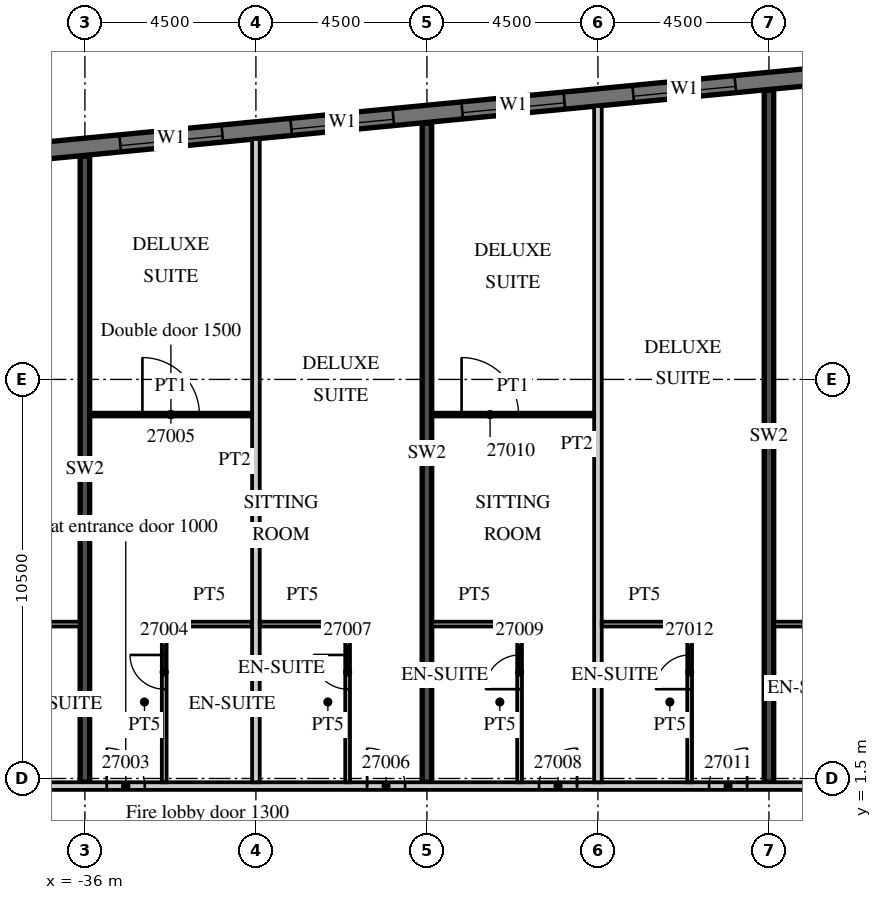
"""IFC4 building model, lengths in metres.
Left out: names, types, materials, properties, quantities, classifications, styles, units other than length and angle.
Written with IfcOpenShell. Run it as: python <this file> out.ifc"""

import sys

from ifc_helpers import new_model, si_unit, direction, frame, frame_2d, origin, place, context, subcontext, project, spatial, rectangle, extrude, element, fill, save


model = new_model("IFC4")
c1 = context("Model", 3, precision=1e-05, world=origin(), true_north=direction((0.0, 1.0)))
c2 = subcontext(c1, "Body", "Model", "MODEL_VIEW")
j1 = project(units=[si_unit("LENGTHUNIT", "METRE"), si_unit("PLANEANGLEUNIT", "RADIAN")], contexts=[c1])
p1 = place(None, origin())
s1 = spatial("IfcSite", under=j1, at=p1, CompositionType="ELEMENT")
p2 = place(p1, origin())
s2 = spatial("IfcBuilding", under=s1, at=p2, CompositionType="ELEMENT")
p3 = place(p2, frame((0.0, 0.0, 124.0)))
s3 = spatial("IfcBuildingStorey", under=s2, at=p3, CompositionType="ELEMENT", Elevation=124.0)
p4 = place(p3, frame((-36.0, 1.4, 0.0), z_axis=(0.0, 0.0, 1.0), x_axis=(0.0, 1.0, 0.0)))
e1 = element("IfcWall", 1, at=p4, inside=s3, PredefinedType="SHEAR", context=c2, shape_type="SweptSolid", body=[
    extrude(rectangle(XDim=16.474, YDim=0.25, at=frame_2d((8.237, 0.0))), origin(), (0.0, 0.0, 1.0), 3.3),
])
p5 = place(p3, frame((-27.0, 1.4, 0.0), z_axis=(0.0, 0.0, 1.0), x_axis=(0.0, 1.0, 0.0)))
e2 = element("IfcWall", 2, at=p5, inside=s3, PredefinedType="SHEAR", context=c2, shape_type="SweptSolid", body=[
    extrude(rectangle(XDim=17.34, YDim=0.25, at=frame_2d((8.67, 0.0))), origin(), (0.0, 0.0, 1.0), 3.3),
])
p6 = place(p3, frame((-18.0, 1.4, 0.0), z_axis=(0.0, 0.0, 1.0), x_axis=(0.0, 1.0, 0.0)))
e3 = element("IfcWall", 3, at=p6, inside=s3, PredefinedType="SHEAR", context=c2, shape_type="SweptSolid", body=[
    extrude(rectangle(XDim=18.207, YDim=0.25, at=frame_2d((9.104, 0.0))), origin(), (0.0, 0.0, 1.0), 3.3),
])
p7 = place(p3, frame((13.521, 22.89, 0.0), z_axis=(0.0, 0.0, 1.0), x_axis=(-0.995396445054, -0.095843190545, 0.0)))
e4 = element("IfcWall", 4, at=p7, inside=s3, PredefinedType="SOLIDWALL", context=c2, shape_type="SweptSolid", body=[
    extrude(rectangle(XDim=51.114, YDim=0.45, at=frame_2d((25.557, 0.0))), origin(), (0.0, 0.0, 1.0), 3.02),
])
p8 = place(p7, frame((0.91, 0.0, 0.45)))
e5 = element("IfcOpeningElement", 5, at=p8, cuts=e4, PredefinedType="OPENING", context=c2, shape_type="SweptSolid", body=[
    extrude(rectangle(XDim=2.7, YDim=2.25, at=frame_2d((1.35, 1.125))), frame((0.0, 0.235, 0.0), z_axis=(0.0, -1.0, 0.0), x_axis=(1.0, 0.0, 0.0)), (0.0, 0.0, 1.0), 0.47),
])
p9 = place(p7, frame((5.431, 0.0, 0.45)))
e6 = element("IfcOpeningElement", 6, at=p9, cuts=e4, PredefinedType="OPENING", context=c2, shape_type="SweptSolid", body=[
    extrude(rectangle(XDim=2.7, YDim=2.25, at=frame_2d((1.35, 1.125))), frame((0.0, 0.235, 0.0), z_axis=(0.0, -1.0, 0.0), x_axis=(1.0, 0.0, 0.0)), (0.0, 0.0, 1.0), 0.47),
])
p10 = place(p7, frame((9.952, 0.0, 0.45)))
e7 = element("IfcOpeningElement", 7, at=p10, cuts=e4, PredefinedType="OPENING", context=c2, shape_type="SweptSolid", body=[
    extrude(rectangle(XDim=2.7, YDim=2.25, at=frame_2d((1.35, 1.125))), frame((0.0, 0.235, 0.0), z_axis=(0.0, -1.0, 0.0), x_axis=(1.0, 0.0, 0.0)), (0.0, 0.0, 1.0), 0.47),
])
p11 = place(p7, frame((14.473, 0.0, 0.45)))
e8 = element("IfcOpeningElement", 8, at=p11, cuts=e4, PredefinedType="OPENING", context=c2, shape_type="SweptSolid", body=[
    extrude(rectangle(XDim=2.7, YDim=2.25, at=frame_2d((1.35, 1.125))), frame((0.0, 0.235, 0.0), z_axis=(0.0, -1.0, 0.0), x_axis=(1.0, 0.0, 0.0)), (0.0, 0.0, 1.0), 0.47),
])
p12 = place(p7, frame((18.994, 0.0, 0.45)))
e9 = element("IfcOpeningElement", 9, at=p12, cuts=e4, PredefinedType="OPENING", context=c2, shape_type="SweptSolid", body=[
    extrude(rectangle(XDim=2.7, YDim=2.25, at=frame_2d((1.35, 1.125))), frame((0.0, 0.235, 0.0), z_axis=(0.0, -1.0, 0.0), x_axis=(1.0, 0.0, 0.0)), (0.0, 0.0, 1.0), 0.47),
])
p13 = place(p7, frame((23.514, 0.0, 0.45)))
e10 = element("IfcOpeningElement", 10, at=p13, cuts=e4, PredefinedType="OPENING", context=c2, shape_type="SweptSolid", body=[
    extrude(rectangle(XDim=2.7, YDim=2.25, at=frame_2d((1.35, 1.125))), frame((0.0, 0.235, 0.0), z_axis=(0.0, -1.0, 0.0), x_axis=(1.0, 0.0, 0.0)), (0.0, 0.0, 1.0), 0.47),
])
p14 = place(p7, frame((28.035, 0.0, 0.45)))
e11 = element("IfcOpeningElement", 11, at=p14, cuts=e4, PredefinedType="OPENING", context=c2, shape_type="SweptSolid", body=[
    extrude(rectangle(XDim=2.7, YDim=2.25, at=frame_2d((1.35, 1.125))), frame((0.0, 0.235, 0.0), z_axis=(0.0, -1.0, 0.0), x_axis=(1.0, 0.0, 0.0)), (0.0, 0.0, 1.0), 0.47),
])
p15 = place(p7, frame((32.556, 0.0, 0.45)))
e12 = element("IfcOpeningElement", 12, at=p15, cuts=e4, PredefinedType="OPENING", context=c2, shape_type="SweptSolid", body=[
    extrude(rectangle(XDim=2.7, YDim=2.25, at=frame_2d((1.35, 1.125))), frame((0.0, 0.235, 0.0), z_axis=(0.0, -1.0, 0.0), x_axis=(1.0, 0.0, 0.0)), (0.0, 0.0, 1.0), 0.47),
])
p16 = place(p7, frame((37.077, 0.0, 0.45)))
e13 = element("IfcOpeningElement", 13, at=p16, cuts=e4, PredefinedType="OPENING", context=c2, shape_type="SweptSolid", body=[
    extrude(rectangle(XDim=2.7, YDim=2.25, at=frame_2d((1.35, 1.125))), frame((0.0, 0.235, 0.0), z_axis=(0.0, -1.0, 0.0), x_axis=(1.0, 0.0, 0.0)), (0.0, 0.0, 1.0), 0.47),
])
p17 = place(p7, frame((41.598, 0.0, 0.45)))
e14 = element("IfcOpeningElement", 14, at=p17, cuts=e4, PredefinedType="OPENING", context=c2, shape_type="SweptSolid", body=[
    extrude(rectangle(XDim=2.7, YDim=2.25, at=frame_2d((1.35, 1.125))), frame((0.0, 0.235, 0.0), z_axis=(0.0, -1.0, 0.0), x_axis=(1.0, 0.0, 0.0)), (0.0, 0.0, 1.0), 0.47),
])
p18 = place(p7, frame((46.118, 0.0, 0.45)))
e15 = element("IfcOpeningElement", 15, at=p18, cuts=e4, PredefinedType="OPENING", context=c2, shape_type="SweptSolid", body=[
    extrude(rectangle(XDim=2.7, YDim=2.25, at=frame_2d((1.35, 1.125))), frame((0.0, 0.235, 0.0), z_axis=(0.0, -1.0, 0.0), x_axis=(1.0, 0.0, 0.0)), (0.0, 0.0, 1.0), 0.47),
])
p19 = place(p3, frame((-39.316, 1.3, 0.0), z_axis=(0.0, 0.0, 1.0), x_axis=(1.0, 0.0, 0.0)))
e16 = element("IfcWall", 16, at=p19, inside=s3, PredefinedType="PARTITIONING", context=c2, shape_type="SweptSolid", body=[
    extrude(rectangle(XDim=52.816, YDim=0.2, at=frame_2d((26.408, 0.0))), origin(), (0.0, 0.0, 1.0), 3.02),
])
p20 = place(p19, frame((0.15, 0.0, 0.0)))
e17 = element("IfcOpeningElement", 17, at=p20, cuts=e16, PredefinedType="OPENING", context=c2, shape_type="SweptSolid", body=[
    extrude(rectangle(XDim=0.9, YDim=2.1, at=frame_2d((0.45, 1.05))), frame((0.0, 0.11, 0.0), z_axis=(0.0, -1.0, 0.0), x_axis=(1.0, 0.0, 0.0)), (0.0, 0.0, 1.0), 0.22),
])
p21 = place(p19, frame((3.891, 0.0, 0.0)))
e18 = element("IfcOpeningElement", 18, at=p21, cuts=e16, PredefinedType="OPENING", context=c2, shape_type="SweptSolid", body=[
    extrude(rectangle(XDim=1.0, YDim=2.1, at=frame_2d((0.5, 1.05))), frame((0.0, 0.11, 0.0), z_axis=(0.0, -1.0, 0.0), x_axis=(1.0, 0.0, 0.0)), (0.0, 0.0, 1.0), 0.22),
])
p22 = place(p19, frame((10.741, 0.0, 0.0)))
e19 = element("IfcOpeningElement", 19, at=p22, cuts=e16, PredefinedType="OPENING", context=c2, shape_type="SweptSolid", body=[
    extrude(rectangle(XDim=1.0, YDim=2.1, at=frame_2d((0.5, 1.05))), frame((0.0, 0.11, 0.0), z_axis=(0.0, -1.0, 0.0), x_axis=(1.0, 0.0, 0.0)), (0.0, 0.0, 1.0), 0.22),
])
p23 = place(p19, frame((15.266, 0.0, 0.0)))
e20 = element("IfcOpeningElement", 20, at=p23, cuts=e16, PredefinedType="OPENING", context=c2, shape_type="SweptSolid", body=[
    extrude(rectangle(XDim=1.0, YDim=2.1, at=frame_2d((0.5, 1.05))), frame((0.0, 0.11, 0.0), z_axis=(0.0, -1.0, 0.0), x_axis=(1.0, 0.0, 0.0)), (0.0, 0.0, 1.0), 0.22),
])
p24 = place(p19, frame((19.741, 0.0, 0.0)))
e21 = element("IfcOpeningElement", 21, at=p24, cuts=e16, PredefinedType="OPENING", context=c2, shape_type="SweptSolid", body=[
    extrude(rectangle(XDim=1.0, YDim=2.1, at=frame_2d((0.5, 1.05))), frame((0.0, 0.11, 0.0), z_axis=(0.0, -1.0, 0.0), x_axis=(1.0, 0.0, 0.0)), (0.0, 0.0, 1.0), 0.22),
])
p25 = place(p19, frame((26.678, 0.0, 0.0)))
e22 = element("IfcOpeningElement", 22, at=p25, cuts=e16, PredefinedType="OPENING", context=c2, shape_type="SweptSolid", body=[
    extrude(rectangle(XDim=1.2, YDim=2.1, at=frame_2d((0.6, 1.05))), frame((0.0, 0.11, 0.0), z_axis=(0.0, -1.0, 0.0), x_axis=(1.0, 0.0, 0.0)), (0.0, 0.0, 1.0), 0.22),
])
p26 = place(p19, frame((35.678, 0.0, 0.0)))
e23 = element("IfcOpeningElement", 23, at=p26, cuts=e16, PredefinedType="OPENING", context=c2, shape_type="SweptSolid", body=[
    extrude(rectangle(XDim=1.2, YDim=2.1, at=frame_2d((0.6, 1.05))), frame((0.0, 0.11, 0.0), z_axis=(0.0, -1.0, 0.0), x_axis=(1.0, 0.0, 0.0)), (0.0, 0.0, 1.0), 0.22),
])
p27 = place(p19, frame((41.754, 0.0, 0.0)))
e24 = element("IfcOpeningElement", 24, at=p27, cuts=e16, PredefinedType="OPENING", context=c2, shape_type="SweptSolid", body=[
    extrude(rectangle(XDim=1.2, YDim=2.1, at=frame_2d((0.6, 1.05))), frame((0.0, 0.11, 0.0), z_axis=(0.0, -1.0, 0.0), x_axis=(1.0, 0.0, 0.0)), (0.0, 0.0, 1.0), 0.22),
])
p28 = place(p19, frame((51.241, 0.0, 0.0)))
e25 = element("IfcOpeningElement", 25, at=p28, cuts=e16, PredefinedType="OPENING", context=c2, shape_type="SweptSolid", body=[
    extrude(rectangle(XDim=1.0, YDim=2.1, at=frame_2d((0.5, 1.05))), frame((0.0, 0.11, 0.0), z_axis=(0.0, -1.0, 0.0), x_axis=(1.0, 0.0, 0.0)), (0.0, 0.0, 1.0), 0.22),
])
p29 = place(p3, frame((-38.457, 5.562, 0.0), z_axis=(0.0, 0.0, 1.0), x_axis=(1.0, 0.0, 0.0)))
e26 = element("IfcWall", 26, at=p29, inside=s3, PredefinedType="PARTITIONING", context=c2, shape_type="SweptSolid", body=[
    extrude(rectangle(XDim=2.332, YDim=0.125, at=frame_2d((1.166, 0.0))), origin(), (0.0, 0.0, 1.0), 3.02),
])
p30 = place(p3, frame((-31.5, 1.4, 0.0), z_axis=(0.0, 0.0, 1.0), x_axis=(0.0, 1.0, 0.0)))
e27 = element("IfcWall", 27, at=p30, inside=s3, PredefinedType="PARTITIONING", context=c2, shape_type="SweptSolid", body=[
    extrude(rectangle(XDim=16.929, YDim=0.2, at=frame_2d((8.465, 0.0))), origin(), (0.0, 0.0, 1.0), 3.02),
])
p31 = place(p3, frame((-33.913, 1.4, 0.0), z_axis=(0.0, 0.0, 1.0), x_axis=(0.0, 1.0, 0.0)))
e28 = element("IfcWall", 28, at=p31, inside=s3, PredefinedType="PARTITIONING", context=c2, shape_type="SweptSolid", body=[
    extrude(rectangle(XDim=4.225, YDim=0.125, at=frame_2d((2.113, 0.0))), origin(), (0.0, 0.0, 1.0), 3.02),
])
p32 = place(p31, frame((2.45, 0.0, 0.0)))
e29 = element("IfcOpeningElement", 29, at=p32, cuts=e28, PredefinedType="OPENING", context=c2, shape_type="SweptSolid", body=[
    extrude(rectangle(XDim=0.9, YDim=2.1, at=frame_2d((0.45, 1.05))), frame((0.0, 0.073, 0.0), z_axis=(0.0, -1.0, 0.0), x_axis=(1.0, 0.0, 0.0)), (0.0, 0.0, 1.0), 0.145),
])
p33 = place(p3, frame((-33.85, 5.562, 0.0), z_axis=(0.0, 0.0, 1.0), x_axis=(1.0, 0.0, 0.0)))
e30 = element("IfcWall", 30, at=p33, inside=s3, PredefinedType="PARTITIONING", context=c2, shape_type="SweptSolid", body=[
    extrude(rectangle(XDim=2.25, YDim=0.125, at=frame_2d((1.125, 0.0))), origin(), (0.0, 0.0, 1.0), 3.02),
])
p34 = place(p3, frame((-35.875, 11.075, 0.0), z_axis=(0.0, 0.0, 1.0), x_axis=(1.0, 0.0, 0.0)))
e31 = element("IfcWall", 31, at=p34, inside=s3, PredefinedType="PARTITIONING", context=c2, shape_type="SweptSolid", body=[
    extrude(rectangle(XDim=4.275, YDim=0.1, at=frame_2d((2.137, 0.0))), origin(), (0.0, 0.0, 1.0), 3.02),
])
p35 = place(p34, frame((1.388, 0.0, 0.0)))
e32 = element("IfcOpeningElement", 32, at=p35, cuts=e31, PredefinedType="OPENING", context=c2, shape_type="SweptSolid", body=[
    extrude(rectangle(XDim=1.5, YDim=2.1, at=frame_2d((0.75, 1.05))), frame((0.0, 0.06, 0.0), z_axis=(0.0, -1.0, 0.0), x_axis=(1.0, 0.0, 0.0)), (0.0, 0.0, 1.0), 0.12),
])
p36 = place(p3, frame((-29.087, 1.4, 0.0), z_axis=(0.0, 0.0, 1.0), x_axis=(0.0, 1.0, 0.0)))
e33 = element("IfcWall", 33, at=p36, inside=s3, PredefinedType="PARTITIONING", context=c2, shape_type="SweptSolid", body=[
    extrude(rectangle(XDim=4.225, YDim=0.125, at=frame_2d((2.113, 0.0))), origin(), (0.0, 0.0, 1.0), 3.02),
])
p37 = place(p36, frame((2.45, 0.0, 0.0)))
e34 = element("IfcOpeningElement", 34, at=p37, cuts=e33, PredefinedType="OPENING", context=c2, shape_type="SweptSolid", body=[
    extrude(rectangle(XDim=0.9, YDim=2.1, at=frame_2d((0.45, 1.05))), frame((0.0, 0.073, 0.0), z_axis=(0.0, -1.0, 0.0), x_axis=(1.0, 0.0, 0.0)), (0.0, 0.0, 1.0), 0.145),
])
p38 = place(p3, frame((-31.4, 5.562, 0.0), z_axis=(0.0, 0.0, 1.0), x_axis=(1.0, 0.0, 0.0)))
e35 = element("IfcWall", 35, at=p38, inside=s3, PredefinedType="PARTITIONING", context=c2, shape_type="SweptSolid", body=[
    extrude(rectangle(XDim=2.25, YDim=0.125, at=frame_2d((1.125, 0.0))), origin(), (0.0, 0.0, 1.0), 3.02),
])
p39 = place(p3, frame((-22.5, 1.4, 0.0), z_axis=(0.0, 0.0, 1.0), x_axis=(0.0, 1.0, 0.0)))
e36 = element("IfcWall", 36, at=p39, inside=s3, PredefinedType="PARTITIONING", context=c2, shape_type="SweptSolid", body=[
    extrude(rectangle(XDim=17.796, YDim=0.2, at=frame_2d((8.898, 0.0))), origin(), (0.0, 0.0, 1.0), 3.02),
])
p40 = place(p3, frame((-24.562, 1.4, 0.0), z_axis=(0.0, 0.0, 1.0), x_axis=(0.0, 1.0, 0.0)))
e37 = element("IfcWall", 37, at=p40, inside=s3, PredefinedType="PARTITIONING", context=c2, shape_type="SweptSolid", body=[
    extrude(rectangle(XDim=4.225, YDim=0.125, at=frame_2d((2.113, 0.0))), origin(), (0.0, 0.0, 1.0), 3.02),
])
p41 = place(p40, frame((2.45, 0.0, 0.0)))
e38 = element("IfcOpeningElement", 38, at=p41, cuts=e37, PredefinedType="OPENING", context=c2, shape_type="SweptSolid", body=[
    extrude(rectangle(XDim=0.9, YDim=2.1, at=frame_2d((0.45, 1.05))), frame((0.0, 0.073, 0.0), z_axis=(0.0, -1.0, 0.0), x_axis=(1.0, 0.0, 0.0)), (0.0, 0.0, 1.0), 0.145),
])
p42 = place(p3, frame((-26.875, 5.562, 0.0), z_axis=(0.0, 0.0, 1.0), x_axis=(1.0, 0.0, 0.0)))
e39 = element("IfcWall", 39, at=p42, inside=s3, PredefinedType="PARTITIONING", context=c2, shape_type="SweptSolid", body=[
    extrude(rectangle(XDim=2.25, YDim=0.125, at=frame_2d((1.125, 0.0))), origin(), (0.0, 0.0, 1.0), 3.02),
])
p43 = place(p3, frame((-26.875, 11.075, 0.0), z_axis=(0.0, 0.0, 1.0), x_axis=(1.0, 0.0, 0.0)))
e40 = element("IfcWall", 40, at=p43, inside=s3, PredefinedType="PARTITIONING", context=c2, shape_type="SweptSolid", body=[
    extrude(rectangle(XDim=4.275, YDim=0.1, at=frame_2d((2.137, 0.0))), origin(), (0.0, 0.0, 1.0), 3.02),
])
p44 = place(p43, frame((0.787, 0.0, 0.0)))
e41 = element("IfcOpeningElement", 41, at=p44, cuts=e40, PredefinedType="OPENING", context=c2, shape_type="SweptSolid", body=[
    extrude(rectangle(XDim=1.5, YDim=2.1, at=frame_2d((0.75, 1.05))), frame((0.0, 0.06, 0.0), z_axis=(0.0, -1.0, 0.0), x_axis=(1.0, 0.0, 0.0)), (0.0, 0.0, 1.0), 0.12),
])
p45 = place(p3, frame((-20.087, 1.4, 0.0), z_axis=(0.0, 0.0, 1.0), x_axis=(0.0, 1.0, 0.0)))
e42 = element("IfcWall", 42, at=p45, inside=s3, PredefinedType="PARTITIONING", context=c2, shape_type="SweptSolid", body=[
    extrude(rectangle(XDim=4.225, YDim=0.125, at=frame_2d((2.113, 0.0))), origin(), (0.0, 0.0, 1.0), 3.02),
])
p46 = place(p45, frame((2.45, 0.0, 0.0)))
e43 = element("IfcOpeningElement", 43, at=p46, cuts=e42, PredefinedType="OPENING", context=c2, shape_type="SweptSolid", body=[
    extrude(rectangle(XDim=0.9, YDim=2.1, at=frame_2d((0.45, 1.05))), frame((0.0, 0.073, 0.0), z_axis=(0.0, -1.0, 0.0), x_axis=(1.0, 0.0, 0.0)), (0.0, 0.0, 1.0), 0.145),
])
p47 = place(p3, frame((-22.4, 5.562, 0.0), z_axis=(0.0, 0.0, 1.0), x_axis=(1.0, 0.0, 0.0)))
e44 = element("IfcWall", 44, at=p47, inside=s3, PredefinedType="PARTITIONING", context=c2, shape_type="SweptSolid", body=[
    extrude(rectangle(XDim=2.25, YDim=0.125, at=frame_2d((1.125, 0.0))), origin(), (0.0, 0.0, 1.0), 3.02),
])
p48 = place(p3, frame((-17.875, 5.562, 0.0), z_axis=(0.0, 0.0, 1.0), x_axis=(1.0, 0.0, 0.0)))
e45 = element("IfcWall", 45, at=p48, inside=s3, PredefinedType="PARTITIONING", context=c2, shape_type="SweptSolid", body=[
    extrude(rectangle(XDim=2.8, YDim=0.125, at=frame_2d((1.4, 0.0))), origin(), (0.0, 0.0, 1.0), 3.02),
])
p49 = place(p15, origin())
e46 = element("IfcWindow", 46, at=p49, inside=s3, PartitioningType="SINGLE_PANEL", PredefinedType="WINDOW", context=c2, shape_type="SweptSolid", body=[
    extrude(rectangle(XDim=2.7, YDim=2.25, at=frame_2d((1.35, 1.125))), frame((0.0, 0.09, 0.0), z_axis=(0.0, -1.0, 0.0), x_axis=(1.0, 0.0, 0.0)), (0.0, 0.0, 1.0), 0.06),
])
fill(e12, e46)
p50 = place(p16, origin())
e47 = element("IfcWindow", 47, at=p50, inside=s3, PartitioningType="SINGLE_PANEL", PredefinedType="WINDOW", context=c2, shape_type="SweptSolid", body=[
    extrude(rectangle(XDim=2.7, YDim=2.25, at=frame_2d((1.35, 1.125))), frame((0.0, 0.09, 0.0), z_axis=(0.0, -1.0, 0.0), x_axis=(1.0, 0.0, 0.0)), (0.0, 0.0, 1.0), 0.06),
])
fill(e13, e47)
p51 = place(p17, origin())
e48 = element("IfcWindow", 48, at=p51, inside=s3, PartitioningType="SINGLE_PANEL", PredefinedType="WINDOW", context=c2, shape_type="SweptSolid", body=[
    extrude(rectangle(XDim=2.7, YDim=2.25, at=frame_2d((1.35, 1.125))), frame((0.0, 0.09, 0.0), z_axis=(0.0, -1.0, 0.0), x_axis=(1.0, 0.0, 0.0)), (0.0, 0.0, 1.0), 0.06),
])
fill(e14, e48)
p52 = place(p18, origin())
e49 = element("IfcWindow", 49, at=p52, inside=s3, PartitioningType="SINGLE_PANEL", PredefinedType="WINDOW", context=c2, shape_type="SweptSolid", body=[
    extrude(rectangle(XDim=2.7, YDim=2.25, at=frame_2d((1.35, 1.125))), frame((0.0, 0.09, 0.0), z_axis=(0.0, -1.0, 0.0), x_axis=(1.0, 0.0, 0.0)), (0.0, 0.0, 1.0), 0.06),
])
fill(e15, e49)
p53 = place(p21, origin())
e50 = element("IfcDoor", 50, at=p53, inside=s3, OperationType="SINGLE_SWING_LEFT", PredefinedType="DOOR", context=c2, shape_type="SweptSolid", body=[
    extrude(rectangle(XDim=1.0, YDim=2.1, at=frame_2d((0.5, 1.05))), frame((0.0, 0.025, 0.0), z_axis=(0.0, -1.0, 0.0), x_axis=(1.0, 0.0, 0.0)), (0.0, 0.0, 1.0), 0.05),
])
fill(e18, e50)
p54 = place(p32, origin())
e51 = element("IfcDoor", 51, at=p54, inside=s3, OperationType="SINGLE_SWING_RIGHT", PredefinedType="DOOR", context=c2, shape_type="SweptSolid", body=[
    extrude(rectangle(XDim=0.9, YDim=2.1, at=frame_2d((0.45, 1.05))), frame((0.0, 0.025, 0.0), z_axis=(0.0, -1.0, 0.0), x_axis=(1.0, 0.0, 0.0)), (0.0, 0.0, 1.0), 0.05),
])
fill(e29, e51)
p55 = place(p35, origin())
e52 = element("IfcDoor", 52, at=p55, inside=s3, OperationType="SINGLE_SWING_LEFT", PredefinedType="DOOR", context=c2, shape_type="SweptSolid", body=[
    extrude(rectangle(XDim=1.5, YDim=2.1, at=frame_2d((0.75, 1.05))), frame((0.0, 0.025, 0.0), z_axis=(0.0, -1.0, 0.0), x_axis=(1.0, 0.0, 0.0)), (0.0, 0.0, 1.0), 0.05),
])
fill(e32, e52)
p56 = place(p22, origin())
e53 = element("IfcDoor", 53, at=p56, inside=s3, OperationType="SINGLE_SWING_LEFT", PredefinedType="DOOR", context=c2, shape_type="SweptSolid", body=[
    extrude(rectangle(XDim=1.0, YDim=2.1, at=frame_2d((0.5, 1.05))), frame((0.0, 0.025, 0.0), z_axis=(0.0, -1.0, 0.0), x_axis=(1.0, 0.0, 0.0)), (0.0, 0.0, 1.0), 0.05),
])
fill(e19, e53)
p57 = place(p37, origin())
e54 = element("IfcDoor", 54, at=p57, inside=s3, OperationType="SINGLE_SWING_RIGHT", PredefinedType="DOOR", context=c2, shape_type="SweptSolid", body=[
    extrude(rectangle(XDim=0.9, YDim=2.1, at=frame_2d((0.45, 1.05))), frame((0.0, 0.025, 0.0), z_axis=(0.0, -1.0, 0.0), x_axis=(1.0, 0.0, 0.0)), (0.0, 0.0, 1.0), 0.05),
])
fill(e34, e54)
p58 = place(p23, origin())
e55 = element("IfcDoor", 55, at=p58, inside=s3, OperationType="SINGLE_SWING_RIGHT", PredefinedType="DOOR", context=c2, shape_type="SweptSolid", body=[
    extrude(rectangle(XDim=1.0, YDim=2.1, at=frame_2d((0.5, 1.05))), frame((0.0, 0.025, 0.0), z_axis=(0.0, -1.0, 0.0), x_axis=(1.0, 0.0, 0.0)), (0.0, 0.0, 1.0), 0.05),
])
fill(e20, e55)
p59 = place(p41, origin())
e56 = element("IfcDoor", 56, at=p59, inside=s3, OperationType="SINGLE_SWING_LEFT", PredefinedType="DOOR", context=c2, shape_type="SweptSolid", body=[
    extrude(rectangle(XDim=0.9, YDim=2.1, at=frame_2d((0.45, 1.05))), frame((0.0, 0.025, 0.0), z_axis=(0.0, -1.0, 0.0), x_axis=(1.0, 0.0, 0.0)), (0.0, 0.0, 1.0), 0.05),
])
fill(e38, e56)
p60 = place(p44, origin())
e57 = element("IfcDoor", 57, at=p60, inside=s3, OperationType="SINGLE_SWING_LEFT", PredefinedType="DOOR", context=c2, shape_type="SweptSolid", body=[
    extrude(rectangle(XDim=1.5, YDim=2.1, at=frame_2d((0.75, 1.05))), frame((0.0, 0.025, 0.0), z_axis=(0.0, -1.0, 0.0), x_axis=(1.0, 0.0, 0.0)), (0.0, 0.0, 1.0), 0.05),
])
fill(e41, e57)
p61 = place(p24, origin())
e58 = element("IfcDoor", 58, at=p61, inside=s3, OperationType="SINGLE_SWING_RIGHT", PredefinedType="DOOR", context=c2, shape_type="SweptSolid", body=[
    extrude(rectangle(XDim=1.0, YDim=2.1, at=frame_2d((0.5, 1.05))), frame((0.0, 0.025, 0.0), z_axis=(0.0, -1.0, 0.0), x_axis=(1.0, 0.0, 0.0)), (0.0, 0.0, 1.0), 0.05),
])
fill(e21, e58)
p62 = place(p46, origin())
e59 = element("IfcDoor", 59, at=p62, inside=s3, OperationType="SINGLE_SWING_LEFT", PredefinedType="DOOR", context=c2, shape_type="SweptSolid", body=[
    extrude(rectangle(XDim=0.9, YDim=2.1, at=frame_2d((0.45, 1.05))), frame((0.0, 0.025, 0.0), z_axis=(0.0, -1.0, 0.0), x_axis=(1.0, 0.0, 0.0)), (0.0, 0.0, 1.0), 0.05),
])
fill(e43, e59)
save(model, sys.argv[1])
